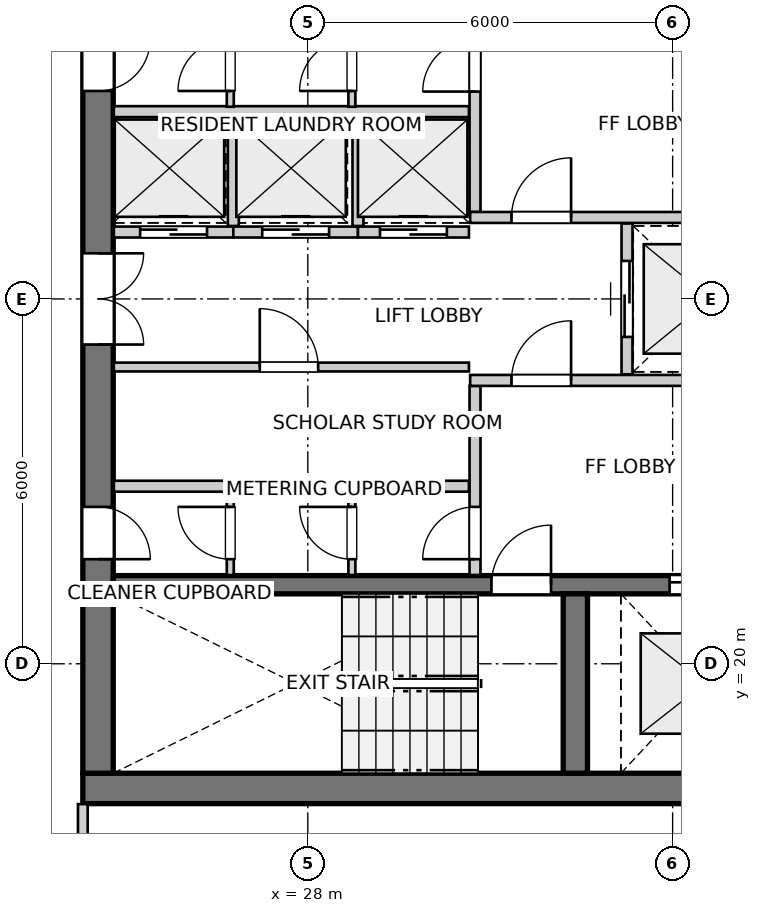
"""IFC4 building model, lengths in metres.
Left out: names, types, materials, properties, quantities, classifications, styles, units other than length and angle.
Written with IfcOpenShell. Run it as: python <this file> out.ifc"""

import sys

from ifc_helpers import new_model, si_unit, direction, frame, frame_2d, origin, place, context, subcontext, project, spatial, rectangle, extrude, source, transform, mapped, element, fill, save


model = new_model("IFC4")
c1 = context("Model", 3, precision=1e-05, world=origin(), true_north=direction((0.0, 1.0)))
c2 = subcontext(c1, "Body", "Model", "MODEL_VIEW")
j1 = project(units=[si_unit("LENGTHUNIT", "METRE"), si_unit("PLANEANGLEUNIT", "RADIAN")], contexts=[c1])
p1 = place(None, origin())
s1 = spatial("IfcSite", under=j1, at=p1, CompositionType="ELEMENT")
p2 = place(p1, origin())
s2 = spatial("IfcBuilding", under=s1, at=p2, CompositionType="ELEMENT")
p3 = place(p2, frame((0.0, 0.0, 214.8)))
s3 = spatial("IfcBuildingStorey", under=s2, at=p3, CompositionType="ELEMENT", Elevation=214.8)
p4 = place(p3, frame((24.3, 17.95, 0.0), z_axis=(0.0, 0.0, 1.0), x_axis=(1.0, 0.0, 0.0)))
e1 = element("IfcWall", 1, at=p4, inside=s3, PredefinedType="SHEAR", context=c2, shape_type="SweptSolid", body=[
    extrude(rectangle(XDim=12.1, YDim=0.5, at=frame_2d((6.05, 0.0))), origin(), (0.0, 0.0, 1.0), 2.96),
])
p5 = place(p3, frame((24.55, 33.8, 0.0), z_axis=(0.0, 0.0, 1.0), x_axis=(0.0, -1.0, 0.0)))
e2 = element("IfcWall", 2, at=p5, inside=s3, PredefinedType="SHEAR", context=c2, shape_type="SweptSolid", body=[
    extrude(rectangle(XDim=15.6, YDim=0.5, at=frame_2d((7.8, 0.0))), origin(), (0.0, 0.0, 1.0), 2.96),
])
p6 = place(p5, frame((7.05, 0.0, 0.0)))
e3 = element("IfcOpeningElement", 3, at=p6, cuts=e2, PredefinedType="OPENING", context=c2, shape_type="SweptSolid", body=[
    extrude(rectangle(XDim=1.5, YDim=2.15, at=frame_2d((0.75, 1.075))), frame((0.0, 0.26, 0.0), z_axis=(0.0, -1.0, 0.0), x_axis=(1.0, 0.0, 0.0)), (0.0, 0.0, 1.0), 0.52),
])
p7 = place(p5, frame((3.52, 0.0, 0.0)))
e4 = element("IfcOpeningElement", 4, at=p7, cuts=e2, PredefinedType="OPENING", context=c2, shape_type="SweptSolid", body=[
    extrude(rectangle(XDim=0.86, YDim=2.05, at=frame_2d((0.43, 1.025))), frame((0.0, 0.26, 0.0), z_axis=(0.0, -1.0, 0.0), x_axis=(1.0, 0.0, 0.0)), (0.0, 0.0, 1.0), 0.52),
])
p8 = place(p5, frame((11.22, 0.0, 0.0)))
e5 = element("IfcOpeningElement", 5, at=p8, cuts=e2, PredefinedType="OPENING", context=c2, shape_type="SweptSolid", body=[
    extrude(rectangle(XDim=0.86, YDim=2.05, at=frame_2d((0.43, 1.025))), frame((0.0, 0.26, 0.0), z_axis=(0.0, -1.0, 0.0), x_axis=(1.0, 0.0, 0.0)), (0.0, 0.0, 1.0), 0.52),
])
p9 = place(p3, frame((24.8, 21.3, 0.0), z_axis=(0.0, 0.0, 1.0), x_axis=(1.0, 0.0, 0.0)))
e6 = element("IfcWall", 6, at=p9, inside=s3, PredefinedType="SHEAR", context=c2, shape_type="SweptSolid", body=[
    extrude(rectangle(XDim=11.1, YDim=0.3, at=frame_2d((5.55, 0.0))), origin(), (0.0, 0.0, 1.0), 2.96),
])
p10 = place(p9, frame((6.22, 0.0, 0.0)))
e7 = element("IfcOpeningElement", 7, at=p10, cuts=e6, PredefinedType="OPENING", context=c2, shape_type="SweptSolid", body=[
    extrude(rectangle(XDim=0.98, YDim=2.15, at=frame_2d((0.49, 1.075))), frame((0.0, 0.16, 0.0), z_axis=(0.0, -1.0, 0.0), x_axis=(1.0, 0.0, 0.0)), (0.0, 0.0, 1.0), 0.32),
])
p11 = place(p9, frame((9.15, 0.0, 0.0)))
e8 = element("IfcOpeningElement", 8, at=p11, cuts=e6, PredefinedType="OPENING", context=c2, shape_type="SweptSolid", body=[
    extrude(rectangle(XDim=1.15, YDim=2.15, at=frame_2d((0.575, 1.075))), frame((0.0, 0.16, 0.0), z_axis=(0.0, -1.0, 0.0), x_axis=(1.0, 0.0, 0.0)), (0.0, 0.0, 1.0), 0.32),
])
p12 = place(p3, frame((32.4, 18.2, 0.0), z_axis=(0.0, 0.0, 1.0), x_axis=(0.0, 1.0, 0.0)))
e9 = element("IfcWall", 9, at=p12, inside=s3, PredefinedType="SHEAR", context=c2, shape_type="SweptSolid", body=[
    extrude(rectangle(XDim=2.95, YDim=0.4, at=frame_2d((1.475, 0.0))), origin(), (0.0, 0.0, 1.0), 2.96),
])
p13 = place(p3, frame((30.75, 21.46, 0.0), z_axis=(0.0, 0.0, 1.0), x_axis=(0.0, 1.0, 0.0)))
e10 = element("IfcWall", 10, at=p13, inside=s3, PredefinedType="PARTITIONING", context=c2, shape_type="SweptSolid", body=[
    extrude(rectangle(XDim=3.11, YDim=0.18, at=frame_2d((1.555, 0.0))), origin(), (0.0, 0.0, 1.0), 2.96),
])
p14 = place(p13, frame((0.26, 0.0, 0.0)))
e11 = element("IfcOpeningElement", 11, at=p14, cuts=e10, PredefinedType="OPENING", context=c2, shape_type="SweptSolid", body=[
    extrude(rectangle(XDim=0.86, YDim=2.05, at=frame_2d((0.43, 1.025))), frame((0.0, 0.1, 0.0), z_axis=(0.0, -1.0, 0.0), x_axis=(1.0, 0.0, 0.0)), (0.0, 0.0, 1.0), 0.2),
])
p15 = place(p3, frame((30.67, 24.66, 0.0), z_axis=(0.0, 0.0, 1.0), x_axis=(1.0, 0.0, 0.0)))
e12 = element("IfcWall", 12, at=p15, inside=s3, PredefinedType="PARTITIONING", context=c2, shape_type="SweptSolid", body=[
    extrude(rectangle(XDim=5.22, YDim=0.18, at=frame_2d((2.61, 0.0))), origin(), (0.0, 0.0, 1.0), 2.96),
])
p16 = place(p15, frame((0.68, 0.0, 0.0)))
e13 = element("IfcOpeningElement", 13, at=p16, cuts=e12, PredefinedType="OPENING", context=c2, shape_type="SweptSolid", body=[
    extrude(rectangle(XDim=0.98, YDim=2.15, at=frame_2d((0.49, 1.075))), frame((0.0, 0.1, 0.0), z_axis=(0.0, -1.0, 0.0), x_axis=(1.0, 0.0, 0.0)), (0.0, 0.0, 1.0), 0.2),
])
p17 = place(p3, frame((30.75, 27.43, 0.0), z_axis=(0.0, 0.0, 1.0), x_axis=(0.0, 1.0, 0.0)))
e14 = element("IfcWall", 14, at=p17, inside=s3, PredefinedType="PARTITIONING", context=c2, shape_type="SweptSolid", body=[
    extrude(rectangle(XDim=3.11, YDim=0.18, at=frame_2d((1.555, 0.0))), origin(), (0.0, 0.0, 1.0), 2.96),
])
p18 = place(p17, frame((1.98, 0.0, 0.0)))
e15 = element("IfcOpeningElement", 15, at=p18, cuts=e14, PredefinedType="OPENING", context=c2, shape_type="SweptSolid", body=[
    extrude(rectangle(XDim=0.86, YDim=2.05, at=frame_2d((0.43, 1.025))), frame((0.0, 0.1, 0.0), z_axis=(0.0, -1.0, 0.0), x_axis=(1.0, 0.0, 0.0)), (0.0, 0.0, 1.0), 0.2),
])
p19 = place(p3, frame((30.67, 27.34, 0.0), z_axis=(0.0, 0.0, 1.0), x_axis=(1.0, 0.0, 0.0)))
e16 = element("IfcWall", 16, at=p19, inside=s3, PredefinedType="PARTITIONING", context=c2, shape_type="SweptSolid", body=[
    extrude(rectangle(XDim=5.22, YDim=0.18, at=frame_2d((2.61, 0.0))), origin(), (0.0, 0.0, 1.0), 2.96),
])
p20 = place(p19, frame((0.68, 0.0, 0.0)))
e17 = element("IfcOpeningElement", 17, at=p20, cuts=e16, PredefinedType="OPENING", context=c2, shape_type="SweptSolid", body=[
    extrude(rectangle(XDim=0.98, YDim=2.15, at=frame_2d((0.49, 1.075))), frame((0.0, 0.1, 0.0), z_axis=(0.0, -1.0, 0.0), x_axis=(1.0, 0.0, 0.0)), (0.0, 0.0, 1.0), 0.2),
])
p21 = place(p3, frame((33.25, 24.76, 0.0), z_axis=(0.0, 0.0, 1.0), x_axis=(0.0, 1.0, 0.0)))
e18 = element("IfcWall", 18, at=p21, inside=s3, PredefinedType="PARTITIONING", context=c2, shape_type="SweptSolid", body=[
    extrude(rectangle(XDim=2.48, YDim=0.18, at=frame_2d((1.24, 0.0))), origin(), (0.0, 0.0, 1.0), 2.96),
])
p22 = place(p21, frame((0.615, 0.0, 0.0)))
e19 = element("IfcOpeningElement", 19, at=p22, cuts=e18, PredefinedType="OPENING", context=c2, shape_type="SweptSolid", body=[
    extrude(rectangle(XDim=1.25, YDim=2.15, at=frame_2d((0.625, 1.075))), frame((0.0, 0.1, 0.0), z_axis=(0.0, -1.0, 0.0), x_axis=(1.0, 0.0, 0.0)), (0.0, 0.0, 1.0), 0.2),
])
p23 = place(p3, frame((24.81, 22.92, 0.0), z_axis=(0.0, 0.0, 1.0), x_axis=(1.0, 0.0, 0.0)))
e20 = element("IfcWall", 20, at=p23, inside=s3, PredefinedType="PARTITIONING", context=c2, shape_type="SweptSolid", body=[
    extrude(rectangle(XDim=5.84, YDim=0.18, at=frame_2d((2.92, 0.0))), origin(), (0.0, 0.0, 1.0), 2.96),
])
p24 = place(p3, frame((24.81, 24.88, 0.0), z_axis=(0.0, 0.0, 1.0), x_axis=(1.0, 0.0, 0.0)))
e21 = element("IfcWall", 21, at=p24, inside=s3, PredefinedType="PARTITIONING", context=c2, shape_type="SweptSolid", body=[
    extrude(rectangle(XDim=5.84, YDim=0.145, at=frame_2d((2.92, 0.0))), origin(), (0.0, 0.0, 1.0), 2.96),
])
p25 = place(p24, frame((2.4, 0.0, 0.0)))
e22 = element("IfcOpeningElement", 22, at=p25, cuts=e21, PredefinedType="OPENING", context=c2, shape_type="SweptSolid", body=[
    extrude(rectangle(XDim=0.96, YDim=2.1, at=frame_2d((0.48, 1.05))), frame((0.0, 0.083, 0.0), z_axis=(0.0, -1.0, 0.0), x_axis=(1.0, 0.0, 0.0)), (0.0, 0.0, 1.0), 0.165),
])
p26 = place(p3, frame((24.81, 29.08, 0.0), z_axis=(0.0, 0.0, 1.0), x_axis=(1.0, 0.0, 0.0)))
e23 = element("IfcWall", 23, at=p26, inside=s3, PredefinedType="PARTITIONING", context=c2, shape_type="SweptSolid", body=[
    extrude(rectangle(XDim=5.84, YDim=0.18, at=frame_2d((2.92, 0.0))), origin(), (0.0, 0.0, 1.0), 2.96),
])
p27 = place(p3, frame((24.81, 27.1, 0.0), z_axis=(0.0, 0.0, 1.0), x_axis=(1.0, 0.0, 0.0)))
e24 = element("IfcWall", 24, at=p27, inside=s3, PredefinedType="PARTITIONING", context=c2, shape_type="SweptSolid", body=[
    extrude(rectangle(XDim=1.965, YDim=0.18, at=frame_2d((0.982, 0.0))), origin(), (0.0, 0.0, 1.0), 2.96),
])
p28 = place(p27, frame((0.433, 0.0, 0.0)))
e25 = element("IfcOpeningElement", 25, at=p28, cuts=e24, PredefinedType="OPENING", context=c2, shape_type="SweptSolid", body=[
    extrude(rectangle(XDim=1.1, YDim=2.15, at=frame_2d((0.55, 1.075))), frame((0.0, 0.1, 0.0), z_axis=(0.0, -1.0, 0.0), x_axis=(1.0, 0.0, 0.0)), (0.0, 0.0, 1.0), 0.2),
])
p29 = place(p3, frame((26.775, 27.1, 0.0), z_axis=(0.0, 0.0, 1.0), x_axis=(1.0, 0.0, 0.0)))
e26 = element("IfcWall", 26, at=p29, inside=s3, PredefinedType="PARTITIONING", context=c2, shape_type="SweptSolid", body=[
    extrude(rectangle(XDim=2.05, YDim=0.18, at=frame_2d((1.025, 0.0))), origin(), (0.0, 0.0, 1.0), 2.96),
])
p30 = place(p29, frame((0.475, 0.0, 0.0)))
e27 = element("IfcOpeningElement", 27, at=p30, cuts=e26, PredefinedType="OPENING", context=c2, shape_type="SweptSolid", body=[
    extrude(rectangle(XDim=1.1, YDim=2.15, at=frame_2d((0.55, 1.075))), frame((0.0, 0.1, 0.0), z_axis=(0.0, -1.0, 0.0), x_axis=(1.0, 0.0, 0.0)), (0.0, 0.0, 1.0), 0.2),
])
p31 = place(p3, frame((26.775, 27.2, 0.0), z_axis=(0.0, 0.0, 1.0), x_axis=(0.0, 1.0, 0.0)))
e28 = element("IfcWall", 28, at=p31, inside=s3, PredefinedType="PARTITIONING", context=c2, shape_type="SweptSolid", body=[
    extrude(rectangle(XDim=1.78, YDim=0.18, at=frame_2d((0.89, 0.0))), origin(), (0.0, 0.0, 1.0), 2.96),
])
p32 = place(p3, frame((28.825, 27.1, 0.0), z_axis=(0.0, 0.0, 1.0), x_axis=(1.0, 0.0, 0.0)))
e29 = element("IfcWall", 29, at=p32, inside=s3, PredefinedType="PARTITIONING", context=c2, shape_type="SweptSolid", body=[
    extrude(rectangle(XDim=1.825, YDim=0.18, at=frame_2d((0.913, 0.0))), origin(), (0.0, 0.0, 1.0), 2.96),
])
p33 = place(p32, frame((0.363, 0.0, 0.0)))
e30 = element("IfcOpeningElement", 30, at=p33, cuts=e29, PredefinedType="OPENING", context=c2, shape_type="SweptSolid", body=[
    extrude(rectangle(XDim=1.1, YDim=2.15, at=frame_2d((0.55, 1.075))), frame((0.0, 0.1, 0.0), z_axis=(0.0, -1.0, 0.0), x_axis=(1.0, 0.0, 0.0)), (0.0, 0.0, 1.0), 0.2),
])
p34 = place(p3, frame((28.825, 27.2, 0.0), z_axis=(0.0, 0.0, 1.0), x_axis=(0.0, 1.0, 0.0)))
e31 = element("IfcWall", 31, at=p34, inside=s3, PredefinedType="PARTITIONING", context=c2, shape_type="SweptSolid", body=[
    extrude(rectangle(XDim=1.78, YDim=0.18, at=frame_2d((0.89, 0.0))), origin(), (0.0, 0.0, 1.0), 2.96),
])
p35 = place(p3, frame((26.725, 21.46, 0.0), z_axis=(0.0, 0.0, 1.0), x_axis=(0.0, 1.0, 0.0)))
e32 = element("IfcWall", 32, at=p35, inside=s3, PredefinedType="PARTITIONING", context=c2, shape_type="SweptSolid", body=[
    extrude(rectangle(XDim=1.38, YDim=0.115, at=frame_2d((0.69, 0.0))), origin(), (0.0, 0.0, 1.0), 2.96),
])
p36 = place(p35, frame((0.26, 0.0, 0.0)))
e33 = element("IfcOpeningElement", 33, at=p36, cuts=e32, PredefinedType="OPENING", context=c2, shape_type="SweptSolid", body=[
    extrude(rectangle(XDim=0.86, YDim=2.05, at=frame_2d((0.43, 1.025))), frame((0.0, 0.067, 0.0), z_axis=(0.0, -1.0, 0.0), x_axis=(1.0, 0.0, 0.0)), (0.0, 0.0, 1.0), 0.135),
])
p37 = place(p3, frame((26.725, 29.16, 0.0), z_axis=(0.0, 0.0, 1.0), x_axis=(0.0, 1.0, 0.0)))
e34 = element("IfcWall", 34, at=p37, inside=s3, PredefinedType="PARTITIONING", context=c2, shape_type="SweptSolid", body=[
    extrude(rectangle(XDim=1.38, YDim=0.115, at=frame_2d((0.69, 0.0))), origin(), (0.0, 0.0, 1.0), 2.96),
])
p38 = place(p37, frame((0.26, 0.0, 0.0)))
e35 = element("IfcOpeningElement", 35, at=p38, cuts=e34, PredefinedType="OPENING", context=c2, shape_type="SweptSolid", body=[
    extrude(rectangle(XDim=0.86, YDim=2.05, at=frame_2d((0.43, 1.025))), frame((0.0, 0.067, 0.0), z_axis=(0.0, -1.0, 0.0), x_axis=(1.0, 0.0, 0.0)), (0.0, 0.0, 1.0), 0.135),
])
p39 = place(p3, frame((28.725, 21.46, 0.0), z_axis=(0.0, 0.0, 1.0), x_axis=(0.0, 1.0, 0.0)))
e36 = element("IfcWall", 36, at=p39, inside=s3, PredefinedType="PARTITIONING", context=c2, shape_type="SweptSolid", body=[
    extrude(rectangle(XDim=1.38, YDim=0.115, at=frame_2d((0.69, 0.0))), origin(), (0.0, 0.0, 1.0), 2.96),
])
p40 = place(p39, frame((0.26, 0.0, 0.0)))
e37 = element("IfcOpeningElement", 37, at=p40, cuts=e36, PredefinedType="OPENING", context=c2, shape_type="SweptSolid", body=[
    extrude(rectangle(XDim=0.86, YDim=2.05, at=frame_2d((0.43, 1.025))), frame((0.0, 0.067, 0.0), z_axis=(0.0, -1.0, 0.0), x_axis=(1.0, 0.0, 0.0)), (0.0, 0.0, 1.0), 0.135),
])
p41 = place(p3, frame((28.725, 29.16, 0.0), z_axis=(0.0, 0.0, 1.0), x_axis=(0.0, 1.0, 0.0)))
e38 = element("IfcWall", 38, at=p41, inside=s3, PredefinedType="PARTITIONING", context=c2, shape_type="SweptSolid", body=[
    extrude(rectangle(XDim=1.38, YDim=0.115, at=frame_2d((0.69, 0.0))), origin(), (0.0, 0.0, 1.0), 2.96),
])
p42 = place(p41, frame((0.26, 0.0, 0.0)))
e39 = element("IfcOpeningElement", 39, at=p42, cuts=e38, PredefinedType="OPENING", context=c2, shape_type="SweptSolid", body=[
    extrude(rectangle(XDim=0.86, YDim=2.05, at=frame_2d((0.43, 1.025))), frame((0.0, 0.067, 0.0), z_axis=(0.0, -1.0, 0.0), x_axis=(1.0, 0.0, 0.0)), (0.0, 0.0, 1.0), 0.135),
])
p43 = place(p3, frame((24.3, 15.042, 0.0), z_axis=(0.0, 0.0, 1.0), x_axis=(0.0, 1.0, 0.0)))
e40 = element("IfcWall", 40, at=p43, inside=s3, PredefinedType="PARTITIONING", context=c2, shape_type="SweptSolid", body=[
    extrude(rectangle(XDim=2.65, YDim=0.16, at=frame_2d((1.325, 0.0))), origin(), (0.0, 0.0, 1.0), 2.96),
])
m1 = source(origin(), c2, "Body", "SweptSolid", [
    extrude(rectangle(XDim=0.98, YDim=2.15, at=frame_2d((0.49, 1.075))), frame((0.0, 0.025, 0.0), z_axis=(0.0, -1.0, 0.0), x_axis=(1.0, 0.0, 0.0)), (0.0, 0.0, 1.0), 0.05),
])
p44 = place(p10, origin())
e41 = element("IfcDoor", 41, at=p44, inside=s3, OperationType="SINGLE_SWING_RIGHT", PredefinedType="DOOR", context=c2, shape_type="MappedRepresentation", body=[
    mapped(m1, transform((0.0, 0.0, 0.0), x_axis=(1.0, 0.0, 0.0), y_axis=(0.0, 1.0, 0.0), z_axis=(0.0, 0.0, 1.0), scale=1.0)),
])
fill(e7, e41)
m2 = source(origin(), c2, "Body", "SweptSolid", [
    extrude(rectangle(XDim=1.15, YDim=2.15, at=frame_2d((0.575, 1.075))), frame((0.0, 0.025, 0.0), z_axis=(0.0, -1.0, 0.0), x_axis=(1.0, 0.0, 0.0)), (0.0, 0.0, 1.0), 0.05),
])
p45 = place(p11, origin())
e42 = element("IfcDoor", 42, at=p45, inside=s3, OperationType="DOUBLE_DOOR_SLIDING", PredefinedType="DOOR", context=c2, shape_type="MappedRepresentation", body=[
    mapped(m2, transform((0.0, 0.0, 0.0), x_axis=(1.0, 0.0, 0.0), y_axis=(0.0, 1.0, 0.0), z_axis=(0.0, 0.0, 1.0), scale=1.0)),
])
fill(e8, e42)
m3 = source(origin(), c2, "Body", "SweptSolid", [
    extrude(rectangle(XDim=1.5, YDim=2.15, at=frame_2d((0.75, 1.075))), frame((0.0, 0.025, 0.0), z_axis=(0.0, -1.0, 0.0), x_axis=(1.0, 0.0, 0.0)), (0.0, 0.0, 1.0), 0.05),
])
p46 = place(p6, origin())
e43 = element("IfcDoor", 43, at=p46, inside=s3, OperationType="DOUBLE_DOOR_SINGLE_SWING", PredefinedType="DOOR", context=c2, shape_type="MappedRepresentation", body=[
    mapped(m3, transform((0.0, 0.0, 0.0), x_axis=(1.0, 0.0, 0.0), y_axis=(0.0, 1.0, 0.0), z_axis=(0.0, 0.0, 1.0), scale=1.0)),
])
fill(e3, e43)
m4 = source(origin(), c2, "Body", "SweptSolid", [
    extrude(rectangle(XDim=0.86, YDim=2.05, at=frame_2d((0.43, 1.025))), frame((0.0, 0.025, 0.0), z_axis=(0.0, -1.0, 0.0), x_axis=(1.0, 0.0, 0.0)), (0.0, 0.0, 1.0), 0.05),
])
p47 = place(p7, origin())
e44 = element("IfcDoor", 44, at=p47, inside=s3, OperationType="SINGLE_SWING_LEFT", PredefinedType="DOOR", context=c2, shape_type="MappedRepresentation", body=[
    mapped(m4, transform((0.0, 0.0, 0.0), x_axis=(1.0, 0.0, 0.0), y_axis=(0.0, 1.0, 0.0), z_axis=(0.0, 0.0, 1.0), scale=1.0)),
])
fill(e4, e44)
p48 = place(p8, origin())
e45 = element("IfcDoor", 45, at=p48, inside=s3, OperationType="SINGLE_SWING_RIGHT", PredefinedType="DOOR", context=c2, shape_type="MappedRepresentation", body=[
    mapped(m4, transform((0.0, 0.0, 0.0), x_axis=(1.0, 0.0, 0.0), y_axis=(0.0, 1.0, 0.0), z_axis=(0.0, 0.0, 1.0), scale=1.0)),
])
fill(e5, e45)
p49 = place(p14, origin())
e46 = element("IfcDoor", 46, at=p49, inside=s3, OperationType="SINGLE_SWING_LEFT", PredefinedType="DOOR", context=c2, shape_type="MappedRepresentation", body=[
    mapped(m4, transform((0.0, 0.0, 0.0), x_axis=(1.0, 0.0, 0.0), y_axis=(0.0, 1.0, 0.0), z_axis=(0.0, 0.0, 1.0), scale=1.0)),
])
fill(e11, e46)
p50 = place(p16, origin())
e47 = element("IfcDoor", 47, at=p50, inside=s3, OperationType="SINGLE_SWING_RIGHT", PredefinedType="DOOR", context=c2, shape_type="MappedRepresentation", body=[
    mapped(m1, transform((0.0, 0.0, 0.0), x_axis=(1.0, 0.0, 0.0), y_axis=(0.0, 1.0, 0.0), z_axis=(0.0, 0.0, 1.0), scale=1.0)),
])
fill(e13, e47)
p51 = place(p18, origin())
e48 = element("IfcDoor", 48, at=p51, inside=s3, OperationType="SINGLE_SWING_LEFT", PredefinedType="DOOR", context=c2, shape_type="MappedRepresentation", body=[
    mapped(m4, transform((0.0, 0.0, 0.0), x_axis=(1.0, 0.0, 0.0), y_axis=(0.0, 1.0, 0.0), z_axis=(0.0, 0.0, 1.0), scale=1.0)),
])
fill(e15, e48)
p52 = place(p20, origin())
e49 = element("IfcDoor", 49, at=p52, inside=s3, OperationType="SINGLE_SWING_RIGHT", PredefinedType="DOOR", context=c2, shape_type="MappedRepresentation", body=[
    mapped(m1, transform((0.0, 0.0, 0.0), x_axis=(1.0, 0.0, 0.0), y_axis=(0.0, 1.0, 0.0), z_axis=(0.0, 0.0, 1.0), scale=1.0)),
])
fill(e17, e49)
m5 = source(origin(), c2, "Body", "SweptSolid", [
    extrude(rectangle(XDim=1.25, YDim=2.15, at=frame_2d((0.625, 1.075))), frame((0.0, 0.025, 0.0), z_axis=(0.0, -1.0, 0.0), x_axis=(1.0, 0.0, 0.0)), (0.0, 0.0, 1.0), 0.05),
])
p53 = place(p22, origin())
e50 = element("IfcDoor", 50, at=p53, inside=s3, OperationType="DOUBLE_DOOR_SLIDING", PredefinedType="DOOR", context=c2, shape_type="MappedRepresentation", body=[
    mapped(m5, transform((0.0, 0.0, 0.0), x_axis=(1.0, 0.0, 0.0), y_axis=(0.0, 1.0, 0.0), z_axis=(0.0, 0.0, 1.0), scale=1.0)),
])
fill(e19, e50)
m6 = source(origin(), c2, "Body", "SweptSolid", [
    extrude(rectangle(XDim=0.96, YDim=2.1, at=frame_2d((0.48, 1.05))), frame((0.0, 0.025, 0.0), z_axis=(0.0, -1.0, 0.0), x_axis=(1.0, 0.0, 0.0)), (0.0, 0.0, 1.0), 0.05),
])
p54 = place(p25, origin())
e51 = element("IfcDoor", 51, at=p54, inside=s3, OperationType="SINGLE_SWING_LEFT", PredefinedType="DOOR", context=c2, shape_type="MappedRepresentation", body=[
    mapped(m6, transform((0.0, 0.0, 0.0), x_axis=(1.0, 0.0, 0.0), y_axis=(0.0, 1.0, 0.0), z_axis=(0.0, 0.0, 1.0), scale=1.0)),
])
fill(e22, e51)
m7 = source(origin(), c2, "Body", "SweptSolid", [
    extrude(rectangle(XDim=1.1, YDim=2.15, at=frame_2d((0.55, 1.075))), frame((0.0, 0.025, 0.0), z_axis=(0.0, -1.0, 0.0), x_axis=(1.0, 0.0, 0.0)), (0.0, 0.0, 1.0), 0.05),
])
p55 = place(p28, origin())
e52 = element("IfcDoor", 52, at=p55, inside=s3, OperationType="DOUBLE_DOOR_SLIDING", PredefinedType="DOOR", context=c2, shape_type="MappedRepresentation", body=[
    mapped(m7, transform((0.0, 0.0, 0.0), x_axis=(1.0, 0.0, 0.0), y_axis=(0.0, 1.0, 0.0), z_axis=(0.0, 0.0, 1.0), scale=1.0)),
])
fill(e25, e52)
p56 = place(p30, origin())
e53 = element("IfcDoor", 53, at=p56, inside=s3, OperationType="DOUBLE_DOOR_SLIDING", PredefinedType="DOOR", context=c2, shape_type="MappedRepresentation", body=[
    mapped(m7, transform((0.0, 0.0, 0.0), x_axis=(1.0, 0.0, 0.0), y_axis=(0.0, 1.0, 0.0), z_axis=(0.0, 0.0, 1.0), scale=1.0)),
])
fill(e27, e53)
p57 = place(p33, origin())
e54 = element("IfcDoor", 54, at=p57, inside=s3, OperationType="DOUBLE_DOOR_SLIDING", PredefinedType="DOOR", context=c2, shape_type="MappedRepresentation", body=[
    mapped(m7, transform((0.0, 0.0, 0.0), x_axis=(1.0, 0.0, 0.0), y_axis=(0.0, 1.0, 0.0), z_axis=(0.0, 0.0, 1.0), scale=1.0)),
])
fill(e30, e54)
p58 = place(p36, origin())
e55 = element("IfcDoor", 55, at=p58, inside=s3, OperationType="SINGLE_SWING_RIGHT", PredefinedType="DOOR", context=c2, shape_type="MappedRepresentation", body=[
    mapped(m4, transform((0.0, 0.0, 0.0), x_axis=(1.0, 0.0, 0.0), y_axis=(0.0, 1.0, 0.0), z_axis=(0.0, 0.0, 1.0), scale=1.0)),
])
fill(e33, e55)
p59 = place(p38, origin())
e56 = element("IfcDoor", 56, at=p59, inside=s3, OperationType="SINGLE_SWING_LEFT", PredefinedType="DOOR", context=c2, shape_type="MappedRepresentation", body=[
    mapped(m4, transform((0.0, 0.0, 0.0), x_axis=(1.0, 0.0, 0.0), y_axis=(0.0, 1.0, 0.0), z_axis=(0.0, 0.0, 1.0), scale=1.0)),
])
fill(e35, e56)
p60 = place(p40, origin())
e57 = element("IfcDoor", 57, at=p60, inside=s3, OperationType="SINGLE_SWING_RIGHT", PredefinedType="DOOR", context=c2, shape_type="MappedRepresentation", body=[
    mapped(m4, transform((0.0, 0.0, 0.0), x_axis=(1.0, 0.0, 0.0), y_axis=(0.0, 1.0, 0.0), z_axis=(0.0, 0.0, 1.0), scale=1.0)),
])
fill(e37, e57)
p61 = place(p42, origin())
e58 = element("IfcDoor", 58, at=p61, inside=s3, OperationType="SINGLE_SWING_LEFT", PredefinedType="DOOR", context=c2, shape_type="MappedRepresentation", body=[
    mapped(m4, transform((0.0, 0.0, 0.0), x_axis=(1.0, 0.0, 0.0), y_axis=(0.0, 1.0, 0.0), z_axis=(0.0, 0.0, 1.0), scale=1.0)),
])
fill(e39, e58)
save(model, sys.argv[1])
